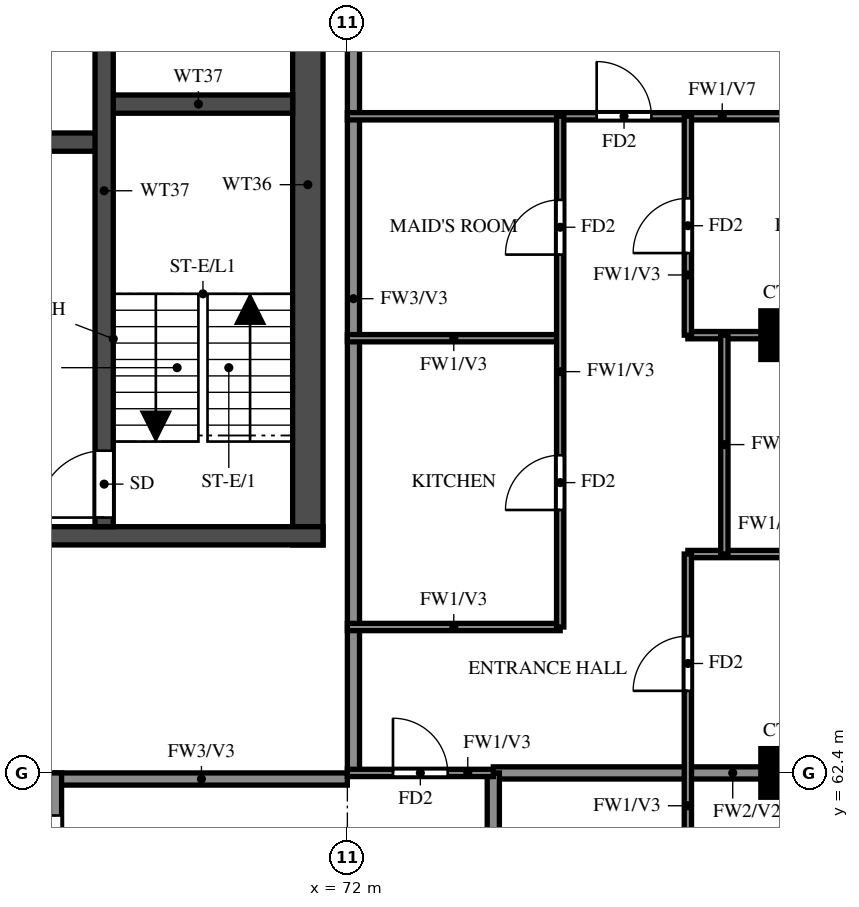
"""IFC4 building model, lengths in metres.
Left out: names, types, materials, properties, quantities, classifications, styles, units other than length and angle.
Written with IfcOpenShell. Run it as: python <this file> out.ifc"""

import sys

from ifc_helpers import new_model, si_unit, direction, frame, frame_2d, origin, origin_2d, place, context, subcontext, project, spatial, rectangle, extrude, source, transform, mapped, element, fill, save


model = new_model("IFC4")
c1 = context("Model", 3, precision=1e-05, world=origin(), true_north=direction((0.0, 1.0)))
c2 = subcontext(c1, "Body", "Model", "MODEL_VIEW")
j1 = project(units=[si_unit("LENGTHUNIT", "METRE"), si_unit("PLANEANGLEUNIT", "RADIAN")], contexts=[c1])
p1 = place(None, origin())
s1 = spatial("IfcSite", under=j1, at=p1, CompositionType="ELEMENT")
p2 = place(p1, origin())
s2 = spatial("IfcBuilding", under=s1, at=p2, CompositionType="ELEMENT")
p3 = place(p2, frame((0.0, 0.0, 232.5)))
s3 = spatial("IfcBuildingStorey", under=s2, at=p3, CompositionType="ELEMENT", Elevation=232.5)
m1 = source(origin(), c2, "Body", "SweptSolid", [
    extrude(rectangle(XDim=0.8, YDim=0.8, at=origin_2d()), origin(), (0.0, 0.0, 1.0), 3.22),
])
for number, where, z_axis, x_axis in (
    (1, (79.2, 62.4, 0.0), (0.0, 0.0, 1.0), (1.0, 0.0, 0.0)),
    (2, (79.2, 69.6, 0.0), (0.0, 0.0, 1.0), (1.0, 0.0, 0.0)),
):
    element("IfcColumn", number, at=place(p3, frame(where, z_axis=z_axis, x_axis=x_axis)), inside=s3, PredefinedType="COLUMN", context=c2, shape_type="MappedRepresentation", body=[
        mapped(m1, transform((0.0, 0.0, 0.0))),
    ])
p4 = place(p3, frame((71.35, 66.15, 0.0), z_axis=(0.0, 0.0, 1.0), x_axis=(0.0, 1.0, 0.0)))
e3 = element("IfcWall", 3, at=p4, inside=s3, PredefinedType="SHEAR", context=c2, shape_type="SweptSolid", body=[
    extrude(rectangle(XDim=11.85, YDim=0.5, at=frame_2d((5.925, 0.0))), origin(), (0.0, 0.0, 1.0), 3.22),
])
p5 = place(p3, frame((29.2, 66.3, 0.0), z_axis=(0.0, 0.0, 1.0), x_axis=(1.0, 0.0, 0.0)))
e4 = element("IfcWall", 4, at=p5, inside=s3, PredefinedType="SHEAR", context=c2, shape_type="SweptSolid", body=[
    extrude(rectangle(XDim=42.4, YDim=0.3, at=frame_2d((21.2, 0.0))), origin(), (0.0, 0.0, 1.0), 3.22),
])
p6 = place(p5, frame((1.425, 0.0, 0.0)))
e5 = element("IfcOpeningElement", 5, at=p6, cuts=e4, PredefinedType="OPENING", context=c2, shape_type="SweptSolid", body=[
    extrude(rectangle(XDim=1.1, YDim=2.1, at=frame_2d((0.55, 1.05))), frame((0.0, 0.16, 0.0), z_axis=(0.0, -1.0, 0.0), x_axis=(1.0, 0.0, 0.0)), (0.0, 0.0, 1.0), 0.32),
])
p7 = place(p5, frame((4.2, 0.0, 0.0)))
e6 = element("IfcOpeningElement", 6, at=p7, cuts=e4, PredefinedType="OPENING", context=c2, shape_type="SweptSolid", body=[
    extrude(rectangle(XDim=1.8, YDim=2.1, at=frame_2d((0.9, 1.05))), frame((0.0, 0.16, 0.0), z_axis=(0.0, -1.0, 0.0), x_axis=(1.0, 0.0, 0.0)), (0.0, 0.0, 1.0), 0.32),
])
p8 = place(p3, frame((32.8, 72.775, 0.0), z_axis=(0.0, 0.0, 1.0), x_axis=(1.0, 0.0, 0.0)))
e7 = element("IfcWall", 7, at=p8, inside=s3, PredefinedType="SHEAR", context=c2, shape_type="SweptSolid", body=[
    extrude(rectangle(XDim=35.2, YDim=0.3, at=frame_2d((17.6, 0.0))), origin(), (0.0, 0.0, 1.0), 3.22),
])
p9 = place(p8, frame((19.8, 0.0, 0.0)))
e8 = element("IfcOpeningElement", 8, at=p9, cuts=e7, PredefinedType="OPENING", context=c2, shape_type="SweptSolid", body=[
    extrude(rectangle(XDim=1.1, YDim=2.1, at=frame_2d((0.55, 1.05))), frame((0.0, 0.16, 0.0), z_axis=(0.0, -1.0, 0.0), x_axis=(1.0, 0.0, 0.0)), (0.0, 0.0, 1.0), 0.32),
])
p10 = place(p8, frame((27.725, 0.0, 0.0)))
e9 = element("IfcOpeningElement", 9, at=p10, cuts=e7, PredefinedType="OPENING", context=c2, shape_type="SweptSolid", body=[
    extrude(rectangle(XDim=1.1, YDim=2.1, at=frame_2d((0.55, 1.05))), frame((0.0, 0.16, 0.0), z_axis=(0.0, -1.0, 0.0), x_axis=(1.0, 0.0, 0.0)), (0.0, 0.0, 1.0), 0.32),
])
p11 = place(p8, frame((30.325, 0.0, 0.0)))
e10 = element("IfcOpeningElement", 10, at=p11, cuts=e7, PredefinedType="OPENING", context=c2, shape_type="SweptSolid", body=[
    extrude(rectangle(XDim=1.1, YDim=2.1, at=frame_2d((0.55, 1.05))), frame((0.0, 0.16, 0.0), z_axis=(0.0, -1.0, 0.0), x_axis=(1.0, 0.0, 0.0)), (0.0, 0.0, 1.0), 0.32),
])
p12 = place(p8, frame((3.825, 0.0, 0.0)))
e11 = element("IfcOpeningElement", 11, at=p12, cuts=e7, PredefinedType="OPENING", context=c2, shape_type="SweptSolid", body=[
    extrude(rectangle(XDim=1.1, YDim=2.1, at=frame_2d((0.55, 1.05))), frame((0.0, 0.16, 0.0), z_axis=(0.0, -1.0, 0.0), x_axis=(1.0, 0.0, 0.0)), (0.0, 0.0, 1.0), 0.32),
])
p13 = place(p8, frame((6.575, 0.0, 0.0)))
e12 = element("IfcOpeningElement", 12, at=p13, cuts=e7, PredefinedType="OPENING", context=c2, shape_type="SweptSolid", body=[
    extrude(rectangle(XDim=1.1, YDim=2.1, at=frame_2d((0.55, 1.05))), frame((0.0, 0.16, 0.0), z_axis=(0.0, -1.0, 0.0), x_axis=(1.0, 0.0, 0.0)), (0.0, 0.0, 1.0), 0.32),
])
p14 = place(p8, frame((9.325, 0.0, 0.0)))
e13 = element("IfcOpeningElement", 13, at=p14, cuts=e7, PredefinedType="OPENING", context=c2, shape_type="SweptSolid", body=[
    extrude(rectangle(XDim=1.1, YDim=2.1, at=frame_2d((0.55, 1.05))), frame((0.0, 0.16, 0.0), z_axis=(0.0, -1.0, 0.0), x_axis=(1.0, 0.0, 0.0)), (0.0, 0.0, 1.0), 0.32),
])
p15 = place(p8, frame((12.075, 0.0, 0.0)))
e14 = element("IfcOpeningElement", 14, at=p15, cuts=e7, PredefinedType="OPENING", context=c2, shape_type="SweptSolid", body=[
    extrude(rectangle(XDim=1.1, YDim=2.1, at=frame_2d((0.55, 1.05))), frame((0.0, 0.16, 0.0), z_axis=(0.0, -1.0, 0.0), x_axis=(1.0, 0.0, 0.0)), (0.0, 0.0, 1.0), 0.32),
])
p16 = place(p8, frame((14.825, 0.0, 0.0)))
e15 = element("IfcOpeningElement", 15, at=p16, cuts=e7, PredefinedType="OPENING", context=c2, shape_type="SweptSolid", body=[
    extrude(rectangle(XDim=1.1, YDim=2.1, at=frame_2d((0.55, 1.05))), frame((0.0, 0.16, 0.0), z_axis=(0.0, -1.0, 0.0), x_axis=(1.0, 0.0, 0.0)), (0.0, 0.0, 1.0), 0.32),
])
p17 = place(p8, frame((17.575, 0.0, 0.0)))
e16 = element("IfcOpeningElement", 16, at=p17, cuts=e7, PredefinedType="OPENING", context=c2, shape_type="SweptSolid", body=[
    extrude(rectangle(XDim=1.1, YDim=2.1, at=frame_2d((0.55, 1.05))), frame((0.0, 0.16, 0.0), z_axis=(0.0, -1.0, 0.0), x_axis=(1.0, 0.0, 0.0)), (0.0, 0.0, 1.0), 0.32),
])
p18 = place(p8, frame((0.95, 0.0, 0.0)))
e17 = element("IfcOpeningElement", 17, at=p18, cuts=e7, PredefinedType="OPENING", context=c2, shape_type="SweptSolid", body=[
    extrude(rectangle(XDim=1.1, YDim=2.1, at=frame_2d((0.55, 1.05))), frame((0.0, 0.16, 0.0), z_axis=(0.0, -1.0, 0.0), x_axis=(1.0, 0.0, 0.0)), (0.0, 0.0, 1.0), 0.32),
])
p19 = place(p3, frame((68.0, 73.4, 0.0), z_axis=(0.0, 0.0, 1.0), x_axis=(1.0, 0.0, 0.0)))
e18 = element("IfcWall", 18, at=p19, inside=s3, PredefinedType="SHEAR", context=c2, shape_type="SweptSolid", body=[
    extrude(rectangle(XDim=3.1, YDim=0.3, at=frame_2d((1.55, 0.0))), origin(), (0.0, 0.0, 1.0), 3.22),
])
p20 = place(p3, frame((68.0, 66.45, 0.0), z_axis=(0.0, 0.0, 1.0), x_axis=(0.0, 1.0, 0.0)))
e19 = element("IfcWall", 19, at=p20, inside=s3, PredefinedType="SHEAR", context=c2, shape_type="SweptSolid", body=[
    extrude(rectangle(XDim=11.05, YDim=0.3, at=frame_2d((5.525, 0.0))), origin(), (0.0, 0.0, 1.0), 3.22),
])
p21 = place(p20, frame((0.15, 0.0, 0.0)))
e20 = element("IfcOpeningElement", 20, at=p21, cuts=e19, PredefinedType="OPENING", context=c2, shape_type="SweptSolid", body=[
    extrude(rectangle(XDim=1.1, YDim=2.1, at=frame_2d((0.55, 1.05))), frame((0.0, 0.16, 0.0), z_axis=(0.0, -1.0, 0.0), x_axis=(1.0, 0.0, 0.0)), (0.0, 0.0, 1.0), 0.32),
])
p22 = place(p3, frame((67.2, 62.3, 0.0), z_axis=(0.0, 0.0, 1.0), x_axis=(1.0, 0.0, 0.0)))
e21 = element("IfcWall", 21, at=p22, inside=s3, PredefinedType="SOLIDWALL", context=c2, shape_type="SweptSolid", body=[
    extrude(rectangle(XDim=4.8, YDim=0.2, at=frame_2d((2.4, 0.0))), origin(), (0.0, 0.0, 1.0), 3.22),
])
p23 = place(p3, frame((67.2, 45.6, 0.0), z_axis=(0.0, 0.0, 1.0), x_axis=(0.0, 1.0, 0.0)))
e22 = element("IfcWall", 22, at=p23, inside=s3, PredefinedType="SOLIDWALL", context=c2, shape_type="SweptSolid", body=[
    extrude(rectangle(XDim=16.8, YDim=0.2, at=frame_2d((8.4, 0.0))), origin(), (0.0, 0.0, 1.0), 3.22),
])
p24 = place(p23, frame((6.7, 0.0, 0.0)))
e23 = element("IfcOpeningElement", 23, at=p24, cuts=e22, PredefinedType="OPENING", context=c2, shape_type="SweptSolid", body=[
    extrude(rectangle(XDim=1.0, YDim=2.1, at=frame_2d((0.5, 1.05))), frame((0.0, 0.11, 0.0), z_axis=(0.0, -1.0, 0.0), x_axis=(1.0, 0.0, 0.0)), (0.0, 0.0, 1.0), 0.22),
])
p25 = place(p23, frame((15.1, 0.0, 0.0)))
e24 = element("IfcOpeningElement", 24, at=p25, cuts=e22, PredefinedType="OPENING", context=c2, shape_type="SweptSolid", body=[
    extrude(rectangle(XDim=1.0, YDim=2.1, at=frame_2d((0.5, 1.05))), frame((0.0, 0.11, 0.0), z_axis=(0.0, -1.0, 0.0), x_axis=(1.0, 0.0, 0.0)), (0.0, 0.0, 1.0), 0.22),
])
p26 = place(p23, frame((0.7, 0.0, 0.0)))
e25 = element("IfcOpeningElement", 25, at=p26, cuts=e22, PredefinedType="OPENING", context=c2, shape_type="SweptSolid", body=[
    extrude(rectangle(XDim=1.0, YDim=2.1, at=frame_2d((0.5, 1.05))), frame((0.0, 0.11, 0.0), z_axis=(0.0, -1.0, 0.0), x_axis=(1.0, 0.0, 0.0)), (0.0, 0.0, 1.0), 0.22),
])
p27 = place(p3, frame((72.1, 62.4, 0.0), z_axis=(0.0, 0.0, 1.0), x_axis=(0.0, 1.0, 0.0)))
e26 = element("IfcWall", 26, at=p27, inside=s3, PredefinedType="SOLIDWALL", context=c2, shape_type="SweptSolid", body=[
    extrude(rectangle(XDim=15.6, YDim=0.2, at=frame_2d((7.8, 0.0))), origin(), (0.0, 0.0, 1.0), 3.22),
])
p28 = place(p3, frame((74.4, 62.4, 0.0), z_axis=(0.0, 0.0, 1.0), x_axis=(1.0, 0.0, 0.0)))
e27 = element("IfcWall", 27, at=p28, inside=s3, PredefinedType="SOLIDWALL", context=c2, shape_type="SweptSolid", body=[
    extrude(rectangle(XDim=7.875, YDim=0.2, at=frame_2d((3.938, 0.0))), origin(), (0.0, 0.0, 1.0), 3.22),
])
p29 = place(p3, frame((74.4, 60.0, 0.0), z_axis=(0.0, 0.0, 1.0), x_axis=(0.0, 1.0, 0.0)))
e28 = element("IfcWall", 28, at=p29, inside=s3, PredefinedType="SOLIDWALL", context=c2, shape_type="SweptSolid", body=[
    extrude(rectangle(XDim=2.4, YDim=0.2, at=frame_2d((1.2, 0.0))), origin(), (0.0, 0.0, 1.0), 3.22),
])
p30 = place(p3, frame((72.0, 62.4, 0.0), z_axis=(0.0, 0.0, 1.0), x_axis=(1.0, 0.0, 0.0)))
e29 = element("IfcWall", 29, at=p30, inside=s3, PredefinedType="PARTITIONING", context=c2, shape_type="SweptSolid", body=[
    extrude(rectangle(XDim=2.4, YDim=0.12, at=frame_2d((1.2, 0.0))), origin(), (0.0, 0.0, 1.0), 3.22),
])
p31 = place(p30, frame((0.75, 0.0, 0.0)))
e30 = element("IfcOpeningElement", 30, at=p31, cuts=e29, PredefinedType="OPENING", context=c2, shape_type="SweptSolid", body=[
    extrude(rectangle(XDim=0.9, YDim=2.1, at=frame_2d((0.45, 1.05))), frame((0.0, 0.07, 0.0), z_axis=(0.0, -1.0, 0.0), x_axis=(1.0, 0.0, 0.0)), (0.0, 0.0, 1.0), 0.14),
])
p32 = place(p3, frame((72.0, 64.8, 0.0), z_axis=(0.0, 0.0, 1.0), x_axis=(1.0, 0.0, 0.0)))
e31 = element("IfcWall", 31, at=p32, inside=s3, PredefinedType="PARTITIONING", context=c2, shape_type="SweptSolid", body=[
    extrude(rectangle(XDim=3.5, YDim=0.12, at=frame_2d((1.75, 0.0))), origin(), (0.0, 0.0, 1.0), 3.22),
])
p33 = place(p3, frame((77.6, 66.0, 0.0), z_axis=(0.0, 0.0, 1.0), x_axis=(1.0, 0.0, 0.0)))
e32 = element("IfcWall", 32, at=p33, inside=s3, PredefinedType="PARTITIONING", context=c2, shape_type="SweptSolid", body=[
    extrude(rectangle(XDim=4.675, YDim=0.12, at=frame_2d((2.337, 0.0))), origin(), (0.0, 0.0, 1.0), 2.32),
])
p34 = place(p33, frame((2.238, 0.0, 0.0)))
e33 = element("IfcOpeningElement", 33, at=p34, cuts=e32, PredefinedType="OPENING", context=c2, shape_type="SweptSolid", body=[
    extrude(rectangle(XDim=0.8, YDim=2.1, at=frame_2d((0.4, 1.05))), frame((0.0, 0.07, 0.0), z_axis=(0.0, -1.0, 0.0), x_axis=(1.0, 0.0, 0.0)), (0.0, 0.0, 1.0), 0.14),
])
p35 = place(p3, frame((72.0, 69.55, 0.0), z_axis=(0.0, 0.0, 1.0), x_axis=(1.0, 0.0, 0.0)))
e34 = element("IfcWall", 34, at=p35, inside=s3, PredefinedType="PARTITIONING", context=c2, shape_type="SweptSolid", body=[
    extrude(rectangle(XDim=3.5, YDim=0.12, at=frame_2d((1.75, 0.0))), origin(), (0.0, 0.0, 1.0), 3.22),
])
p36 = place(p3, frame((77.6, 69.6, 0.0), z_axis=(0.0, 0.0, 1.0), x_axis=(1.0, 0.0, 0.0)))
e35 = element("IfcWall", 35, at=p36, inside=s3, PredefinedType="PARTITIONING", context=c2, shape_type="SweptSolid", body=[
    extrude(rectangle(XDim=4.675, YDim=0.12, at=frame_2d((2.337, 0.0))), origin(), (0.0, 0.0, 1.0), 3.22),
])
p37 = place(p3, frame((72.0, 73.2, 0.0), z_axis=(0.0, 0.0, 1.0), x_axis=(1.0, 0.0, 0.0)))
e36 = element("IfcWall", 36, at=p37, inside=s3, PredefinedType="PARTITIONING", context=c2, shape_type="SweptSolid", body=[
    extrude(rectangle(XDim=10.275, YDim=0.12, at=frame_2d((5.137, 0.0))), origin(), (0.0, 0.0, 1.0), 2.32),
])
p38 = place(p37, frame((4.1, 0.0, 0.0)))
e37 = element("IfcOpeningElement", 37, at=p38, cuts=e36, PredefinedType="OPENING", context=c2, shape_type="SweptSolid", body=[
    extrude(rectangle(XDim=0.9, YDim=2.1, at=frame_2d((0.45, 1.05))), frame((0.0, 0.07, 0.0), z_axis=(0.0, -1.0, 0.0), x_axis=(1.0, 0.0, 0.0)), (0.0, 0.0, 1.0), 0.14),
])
p39 = place(p3, frame((75.5, 64.8, 0.0), z_axis=(0.0, 0.0, 1.0), x_axis=(0.0, 1.0, 0.0)))
e38 = element("IfcWall", 38, at=p39, inside=s3, PredefinedType="PARTITIONING", context=c2, shape_type="SweptSolid", body=[
    extrude(rectangle(XDim=8.4, YDim=0.12, at=frame_2d((4.2, 0.0))), origin(), (0.0, 0.0, 1.0), 3.22),
])
p40 = place(p39, frame((1.925, 0.0, 0.0)))
e39 = element("IfcOpeningElement", 39, at=p40, cuts=e38, PredefinedType="OPENING", context=c2, shape_type="SweptSolid", body=[
    extrude(rectangle(XDim=0.9, YDim=2.1, at=frame_2d((0.45, 1.05))), frame((0.0, 0.07, 0.0), z_axis=(0.0, -1.0, 0.0), x_axis=(1.0, 0.0, 0.0)), (0.0, 0.0, 1.0), 0.14),
])
p41 = place(p39, frame((6.125, 0.0, 0.0)))
e40 = element("IfcOpeningElement", 40, at=p41, cuts=e38, PredefinedType="OPENING", context=c2, shape_type="SweptSolid", body=[
    extrude(rectangle(XDim=0.9, YDim=2.1, at=frame_2d((0.45, 1.05))), frame((0.0, 0.07, 0.0), z_axis=(0.0, -1.0, 0.0), x_axis=(1.0, 0.0, 0.0)), (0.0, 0.0, 1.0), 0.14),
])
p42 = place(p3, frame((77.6, 58.8, 0.0), z_axis=(0.0, 0.0, 1.0), x_axis=(0.0, 1.0, 0.0)))
e41 = element("IfcWall", 41, at=p42, inside=s3, PredefinedType="PARTITIONING", context=c2, shape_type="SweptSolid", body=[
    extrude(rectangle(XDim=7.2, YDim=0.12, at=frame_2d((3.6, 0.0))), origin(), (0.0, 0.0, 1.0), 3.22),
])
p43 = place(p42, frame((1.35, 0.0, 0.0)))
e42 = element("IfcOpeningElement", 42, at=p43, cuts=e41, PredefinedType="OPENING", context=c2, shape_type="SweptSolid", body=[
    extrude(rectangle(XDim=0.9, YDim=2.1, at=frame_2d((0.45, 1.05))), frame((0.0, 0.07, 0.0), z_axis=(0.0, -1.0, 0.0), x_axis=(1.0, 0.0, 0.0)), (0.0, 0.0, 1.0), 0.14),
])
p44 = place(p42, frame((4.95, 0.0, 0.0)))
e43 = element("IfcOpeningElement", 43, at=p44, cuts=e41, PredefinedType="OPENING", context=c2, shape_type="SweptSolid", body=[
    extrude(rectangle(XDim=0.9, YDim=2.1, at=frame_2d((0.45, 1.05))), frame((0.0, 0.07, 0.0), z_axis=(0.0, -1.0, 0.0), x_axis=(1.0, 0.0, 0.0)), (0.0, 0.0, 1.0), 0.14),
])
p45 = place(p3, frame((77.6, 69.6, 0.0), z_axis=(0.0, 0.0, 1.0), x_axis=(0.0, 1.0, 0.0)))
e44 = element("IfcWall", 44, at=p45, inside=s3, PredefinedType="PARTITIONING", context=c2, shape_type="SweptSolid", body=[
    extrude(rectangle(XDim=3.6, YDim=0.12, at=frame_2d((1.8, 0.0))), origin(), (0.0, 0.0, 1.0), 3.22),
])
p46 = place(p45, frame((1.35, 0.0, 0.0)))
e45 = element("IfcOpeningElement", 45, at=p46, cuts=e44, PredefinedType="OPENING", context=c2, shape_type="SweptSolid", body=[
    extrude(rectangle(XDim=0.9, YDim=2.1, at=frame_2d((0.45, 1.05))), frame((0.0, 0.07, 0.0), z_axis=(0.0, -1.0, 0.0), x_axis=(1.0, 0.0, 0.0)), (0.0, 0.0, 1.0), 0.14),
])
p47 = place(p3, frame((78.2, 66.0, 0.0), z_axis=(0.0, 0.0, 1.0), x_axis=(0.0, 1.0, 0.0)))
e46 = element("IfcWall", 46, at=p47, inside=s3, PredefinedType="PARTITIONING", context=c2, shape_type="SweptSolid", body=[
    extrude(rectangle(XDim=3.6, YDim=0.12, at=frame_2d((1.8, 0.0))), origin(), (0.0, 0.0, 1.0), 3.22),
])
p48 = place(p21, origin())
e47 = element("IfcDoor", 47, at=p48, inside=s3, OperationType="SINGLE_SWING_RIGHT", PredefinedType="DOOR", context=c2, shape_type="SweptSolid", body=[
    extrude(rectangle(XDim=1.1, YDim=2.1, at=frame_2d((0.55, 1.05))), frame((0.0, 0.025, 0.0), z_axis=(0.0, -1.0, 0.0), x_axis=(1.0, 0.0, 0.0)), (0.0, 0.0, 1.0), 0.05),
])
fill(e20, e47)
p49 = place(p31, origin())
e48 = element("IfcDoor", 48, at=p49, inside=s3, OperationType="SINGLE_SWING_LEFT", PredefinedType="DOOR", context=c2, shape_type="SweptSolid", body=[
    extrude(rectangle(XDim=0.9, YDim=2.1, at=frame_2d((0.45, 1.05))), frame((0.0, 0.025, 0.0), z_axis=(0.0, -1.0, 0.0), x_axis=(1.0, 0.0, 0.0)), (0.0, 0.0, 1.0), 0.05),
])
fill(e30, e48)
p50 = place(p25, origin())
e49 = element("IfcDoor", 49, at=p50, inside=s3, OperationType="SINGLE_SWING_LEFT", PredefinedType="DOOR", context=c2, shape_type="SweptSolid", body=[
    extrude(rectangle(XDim=1.0, YDim=2.1, at=frame_2d((0.5, 1.05))), frame((0.0, 0.025, 0.0), z_axis=(0.0, -1.0, 0.0), x_axis=(1.0, 0.0, 0.0)), (0.0, 0.0, 1.0), 0.05),
])
fill(e24, e49)
p51 = place(p44, origin())
e50 = element("IfcDoor", 50, at=p51, inside=s3, OperationType="SINGLE_SWING_RIGHT", PredefinedType="DOOR", context=c2, shape_type="SweptSolid", body=[
    extrude(rectangle(XDim=0.9, YDim=2.1, at=frame_2d((0.45, 1.05))), frame((0.0, 0.025, 0.0), z_axis=(0.0, -1.0, 0.0), x_axis=(1.0, 0.0, 0.0)), (0.0, 0.0, 1.0), 0.05),
])
fill(e43, e50)
p52 = place(p46, origin())
e51 = element("IfcDoor", 51, at=p52, inside=s3, OperationType="SINGLE_SWING_LEFT", PredefinedType="DOOR", context=c2, shape_type="SweptSolid", body=[
    extrude(rectangle(XDim=0.9, YDim=2.1, at=frame_2d((0.45, 1.05))), frame((0.0, 0.025, 0.0), z_axis=(0.0, -1.0, 0.0), x_axis=(1.0, 0.0, 0.0)), (0.0, 0.0, 1.0), 0.05),
])
fill(e45, e51)
p53 = place(p38, origin())
e52 = element("IfcDoor", 52, at=p53, inside=s3, OperationType="SINGLE_SWING_RIGHT", PredefinedType="DOOR", context=c2, shape_type="SweptSolid", body=[
    extrude(rectangle(XDim=0.9, YDim=2.1, at=frame_2d((0.45, 1.05))), frame((0.0, 0.025, 0.0), z_axis=(0.0, -1.0, 0.0), x_axis=(1.0, 0.0, 0.0)), (0.0, 0.0, 1.0), 0.05),
])
fill(e37, e52)
p54 = place(p40, origin())
e53 = element("IfcDoor", 53, at=p54, inside=s3, OperationType="SINGLE_SWING_LEFT", PredefinedType="DOOR", context=c2, shape_type="SweptSolid", body=[
    extrude(rectangle(XDim=0.9, YDim=2.1, at=frame_2d((0.45, 1.05))), frame((0.0, 0.025, 0.0), z_axis=(0.0, -1.0, 0.0), x_axis=(1.0, 0.0, 0.0)), (0.0, 0.0, 1.0), 0.05),
])
fill(e39, e53)
p55 = place(p41, origin())
e54 = element("IfcDoor", 54, at=p55, inside=s3, OperationType="SINGLE_SWING_LEFT", PredefinedType="DOOR", context=c2, shape_type="SweptSolid", body=[
    extrude(rectangle(XDim=0.9, YDim=2.1, at=frame_2d((0.45, 1.05))), frame((0.0, 0.025, 0.0), z_axis=(0.0, -1.0, 0.0), x_axis=(1.0, 0.0, 0.0)), (0.0, 0.0, 1.0), 0.05),
])
fill(e40, e54)
save(model, sys.argv[1])
